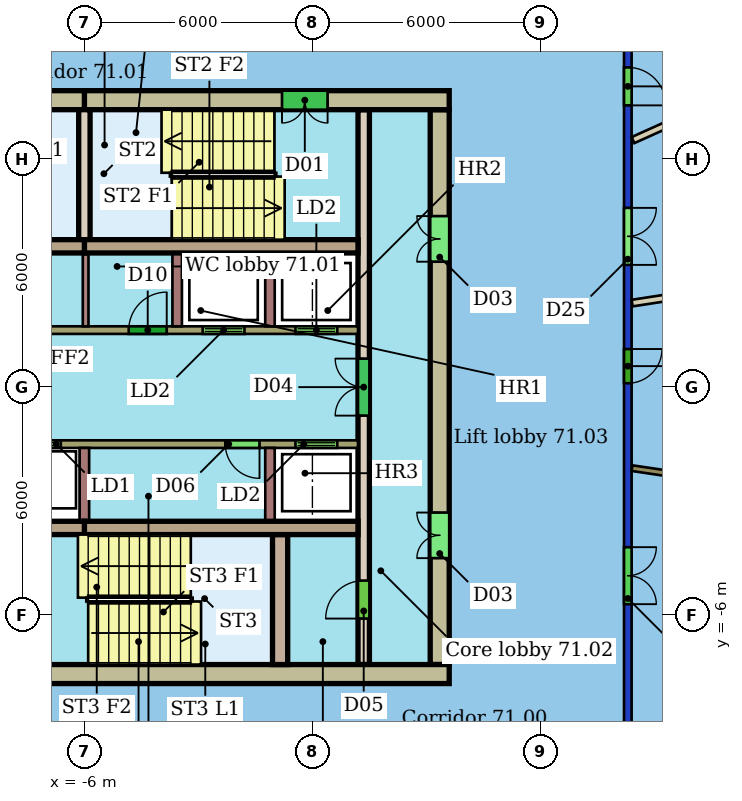
"""IFC4 building model, lengths in metres.
Left out: names, types, materials, properties, quantities, classifications, styles, units other than length and angle.
Written with IfcOpenShell. Run it as: python <this file> out.ifc"""

import sys

from ifc_helpers import new_model, si_unit, direction, frame, frame_2d, origin, place, context, subcontext, project, spatial, rectangle, extrude, element, fill, save


model = new_model("IFC4")
c1 = context("Model", 3, precision=1e-05, world=origin(), true_north=direction((0.0, 1.0)))
c2 = subcontext(c1, "Body", "Model", "MODEL_VIEW")
j1 = project(units=[si_unit("LENGTHUNIT", "METRE"), si_unit("PLANEANGLEUNIT", "RADIAN")], contexts=[c1])
p1 = place(None, origin())
s1 = spatial("IfcSite", under=j1, at=p1, CompositionType="ELEMENT")
p2 = place(p1, origin())
s2 = spatial("IfcBuilding", under=s1, at=p2, CompositionType="ELEMENT")
p3 = place(p2, frame((0.0, 0.0, 286.5)))
s3 = spatial("IfcBuildingStorey", under=s2, at=p3, CompositionType="ELEMENT", Elevation=286.5)
p4 = place(p3, frame((8.3, 9.8, 0.0), z_axis=(0.0, 0.0, 1.0), x_axis=(0.0, -1.0, 0.0)))
e1 = element("IfcWall", 1, at=p4, inside=s3, PredefinedType="PARTITIONING", context=c2, shape_type="SweptSolid", body=[
    extrude(rectangle(XDim=19.6, YDim=0.2, at=frame_2d((9.8, 0.0))), origin(), (0.0, 0.0, 1.0), 3.1),
])
p5 = place(p4, frame((14.011, 0.0, 0.0)))
e2 = element("IfcOpeningElement", 2, at=p5, cuts=e1, PredefinedType="OPENING", context=c2, shape_type="SweptSolid", body=[
    extrude(rectangle(XDim=1.5, YDim=2.1, at=frame_2d((0.75, 1.05))), frame((0.0, 0.11, 0.0), z_axis=(0.0, -1.0, 0.0), x_axis=(1.0, 0.0, 0.0)), (0.0, 0.0, 1.0), 0.22),
])
p6 = place(p4, frame((8.798, 0.0, 0.0)))
e3 = element("IfcOpeningElement", 3, at=p6, cuts=e1, PredefinedType="OPENING", context=c2, shape_type="SweptSolid", body=[
    extrude(rectangle(XDim=0.9, YDim=2.1, at=frame_2d((0.45, 1.05))), frame((0.0, 0.11, 0.0), z_axis=(0.0, -1.0, 0.0), x_axis=(1.0, 0.0, 0.0)), (0.0, 0.0, 1.0), 0.22),
])
p7 = place(p4, frame((5.084, 0.0, 0.0)))
e4 = element("IfcOpeningElement", 4, at=p7, cuts=e1, PredefinedType="OPENING", context=c2, shape_type="SweptSolid", body=[
    extrude(rectangle(XDim=1.5, YDim=2.4, at=frame_2d((0.75, 1.2))), frame((0.0, 0.11, 0.0), z_axis=(0.0, -1.0, 0.0), x_axis=(1.0, 0.0, 0.0)), (0.0, 0.0, 1.0), 0.22),
])
p8 = place(p4, frame((1.387, 0.0, 0.0)))
e5 = element("IfcOpeningElement", 5, at=p8, cuts=e1, PredefinedType="OPENING", context=c2, shape_type="SweptSolid", body=[
    extrude(rectangle(XDim=1.0, YDim=2.1, at=frame_2d((0.5, 1.05))), frame((0.0, 0.11, 0.0), z_axis=(0.0, -1.0, 0.0), x_axis=(1.0, 0.0, 0.0)), (0.0, 0.0, 1.0), 0.22),
])
p9 = place(p3, frame((14.358, -3.012, 0.0), z_axis=(0.0, 0.0, 1.0), x_axis=(-0.989233093571, 0.146348510703, 0.0)))
e6 = element("IfcWall", 6, at=p9, inside=s3, PredefinedType="PARTITIONING", context=c2, shape_type="SweptSolid", body=[
    extrude(rectangle(XDim=6.012, YDim=0.15, at=frame_2d((3.006, 0.0))), origin(), (0.0, 0.0, 1.0), 3.45),
])
p10 = place(p3, frame((15.228, 3.256, 0.0), z_axis=(0.0, 0.0, 1.0), x_axis=(-0.988435478187, -0.151642030654, 0.0)))
e7 = element("IfcWall", 7, at=p10, inside=s3, PredefinedType="PARTITIONING", context=c2, shape_type="SweptSolid", body=[
    extrude(rectangle(XDim=6.894, YDim=0.175, at=frame_2d((3.447, 0.0))), origin(), (0.0, 0.0, 1.0), 3.45),
])
p11 = place(p3, frame((14.644, 9.295, 0.0), z_axis=(0.0, 0.0, 1.0), x_axis=(-0.911835601306, -0.410555521447, 0.0)))
e8 = element("IfcWall", 8, at=p11, inside=s3, PredefinedType="PARTITIONING", context=c2, shape_type="SweptSolid", body=[
    extrude(rectangle(XDim=6.808, YDim=0.175, at=frame_2d((3.404, 0.0))), origin(), (0.0, 0.0, 1.0), 3.45),
])
p12 = place(p3, frame((3.6, 7.55, 0.0), z_axis=(0.0, 0.0, 1.0), x_axis=(-1.0, 0.0, 0.0)))
e9 = element("IfcWall", 9, at=p12, inside=s3, PredefinedType="SHEAR", context=c2, shape_type="SweptSolid", body=[
    extrude(rectangle(XDim=9.6, YDim=0.5, at=frame_2d((4.8, 0.0))), origin(), (0.0, 0.0, 1.0), 3.3),
])
p13 = place(p12, frame((3.2, 0.0, 0.0)))
e10 = element("IfcOpeningElement", 10, at=p13, cuts=e9, PredefinedType="OPENING", context=c2, shape_type="SweptSolid", body=[
    extrude(rectangle(XDim=1.2, YDim=2.1, at=frame_2d((0.6, 1.05))), frame((0.0, 0.26, 0.0), z_axis=(0.0, -1.0, 0.0), x_axis=(1.0, 0.0, 0.0)), (0.0, 0.0, 1.0), 0.52),
])
p14 = place(p3, frame((-6.0, 7.55, 0.0), z_axis=(0.0, 0.0, 1.0), x_axis=(-1.0, 0.0, 0.0)))
e11 = element("IfcWall", 11, at=p14, inside=s3, PredefinedType="SHEAR", context=c2, shape_type="SweptSolid", body=[
    extrude(rectangle(XDim=9.6, YDim=0.5, at=frame_2d((4.8, 0.0))), origin(), (0.0, 0.0, 1.0), 3.3),
])
p15 = place(p14, frame((5.2, 0.0, 0.0)))
e12 = element("IfcOpeningElement", 12, at=p15, cuts=e11, PredefinedType="OPENING", context=c2, shape_type="SweptSolid", body=[
    extrude(rectangle(XDim=1.2, YDim=2.1, at=frame_2d((0.6, 1.05))), frame((0.0, 0.26, 0.0), z_axis=(0.0, -1.0, 0.0), x_axis=(1.0, 0.0, 0.0)), (0.0, 0.0, 1.0), 0.52),
])
p16 = place(p3, frame((-15.6, -7.55, 0.0), z_axis=(0.0, 0.0, 1.0), x_axis=(1.0, 0.0, 0.0)))
e13 = element("IfcWall", 13, at=p16, inside=s3, PredefinedType="SHEAR", context=c2, shape_type="SweptSolid", body=[
    extrude(rectangle(XDim=19.2, YDim=0.5, at=frame_2d((9.6, 0.0))), origin(), (0.0, 0.0, 1.0), 3.3),
])
p17 = place(p16, frame((3.6, 0.0, 0.0)))
e14 = element("IfcOpeningElement", 14, at=p17, cuts=e13, PredefinedType="OPENING", context=c2, shape_type="SweptSolid", body=[
    extrude(rectangle(XDim=1.2, YDim=2.1, at=frame_2d((0.6, 1.05))), frame((0.0, 0.26, 0.0), z_axis=(0.0, -1.0, 0.0), x_axis=(1.0, 0.0, 0.0)), (0.0, 0.0, 1.0), 0.52),
])
p18 = place(p3, frame((3.35, -7.3, 0.0), z_axis=(0.0, 0.0, 1.0), x_axis=(0.0, 1.0, 0.0)))
e15 = element("IfcWall", 15, at=p18, inside=s3, PredefinedType="SHEAR", context=c2, shape_type="SweptSolid", body=[
    extrude(rectangle(XDim=14.6, YDim=0.5, at=frame_2d((7.3, 0.0))), origin(), (0.0, 0.0, 1.0), 3.3),
])
p19 = place(p18, frame((2.8, 0.0, 0.0)))
e16 = element("IfcOpeningElement", 16, at=p19, cuts=e15, PredefinedType="OPENING", context=c2, shape_type="SweptSolid", body=[
    extrude(rectangle(XDim=1.2, YDim=2.1, at=frame_2d((0.6, 1.05))), frame((0.0, 0.26, 0.0), z_axis=(0.0, -1.0, 0.0), x_axis=(1.0, 0.0, 0.0)), (0.0, 0.0, 1.0), 0.52),
])
p20 = place(p18, frame((10.6, 0.0, 0.0)))
e17 = element("IfcOpeningElement", 17, at=p20, cuts=e15, PredefinedType="OPENING", context=c2, shape_type="SweptSolid", body=[
    extrude(rectangle(XDim=1.2, YDim=2.1, at=frame_2d((0.6, 1.05))), frame((0.0, 0.26, 0.0), z_axis=(0.0, -1.0, 0.0), x_axis=(1.0, 0.0, 0.0)), (0.0, 0.0, 1.0), 0.52),
])
for number, where, z_axis, x_axis in (
    (18, (-13.2, 3.705, 0.0), (0.0, 0.0, 1.0), (1.0, 0.0, 0.0)),
    (19, (-6.0, 3.705, 0.0), (0.0, 0.0, 1.0), (1.0, 0.0, 0.0)),
):
    element("IfcWall", number, at=place(p3, frame(where, z_axis=z_axis, x_axis=x_axis)), inside=s3, PredefinedType="SHEAR", context=c2, shape_type="SweptSolid", body=[
        extrude(rectangle(XDim=7.2, YDim=0.35, at=frame_2d((3.6, 0.0))), origin(), (0.0, 0.0, 1.0), 3.3),
    ])
p21 = place(p3, frame((-13.2, -3.705, 0.0), z_axis=(0.0, 0.0, 1.0), x_axis=(1.0, 0.0, 0.0)))
e20 = element("IfcWall", 20, at=p21, inside=s3, PredefinedType="SHEAR", context=c2, shape_type="SweptSolid", body=[
    extrude(rectangle(XDim=7.2, YDim=0.35, at=frame_2d((3.6, 0.0))), origin(), (0.0, 0.0, 1.0), 3.3),
])
p22 = place(p21, frame((0.496, 0.0, 0.0)))
e21 = element("IfcOpeningElement", 21, at=p22, cuts=e20, PredefinedType="OPENING", context=c2, shape_type="SweptSolid", body=[
    extrude(rectangle(XDim=1.2, YDim=2.1, at=frame_2d((0.6, 1.05))), frame((0.0, 0.185, 0.0), z_axis=(0.0, -1.0, 0.0), x_axis=(1.0, 0.0, 0.0)), (0.0, 0.0, 1.0), 0.37),
])
p23 = place(p21, frame((2.938, 0.0, 0.0)))
e22 = element("IfcOpeningElement", 22, at=p23, cuts=e20, PredefinedType="OPENING", context=c2, shape_type="SweptSolid", body=[
    extrude(rectangle(XDim=1.2, YDim=2.1, at=frame_2d((0.6, 1.05))), frame((0.0, 0.185, 0.0), z_axis=(0.0, -1.0, 0.0), x_axis=(1.0, 0.0, 0.0)), (0.0, 0.0, 1.0), 0.37),
])
p24 = place(p3, frame((-6.0, -3.705, 0.0), z_axis=(0.0, 0.0, 1.0), x_axis=(1.0, 0.0, 0.0)))
e23 = element("IfcWall", 23, at=p24, inside=s3, PredefinedType="SHEAR", context=c2, shape_type="SweptSolid", body=[
    extrude(rectangle(XDim=7.2, YDim=0.35, at=frame_2d((3.6, 0.0))), origin(), (0.0, 0.0, 1.0), 3.3),
])
p25 = place(p3, frame((1.35, -7.3, 0.0), z_axis=(0.0, 0.0, 1.0), x_axis=(0.0, 1.0, 0.0)))
e24 = element("IfcWall", 24, at=p25, inside=s3, PredefinedType="SHEAR", context=c2, shape_type="SweptSolid", body=[
    extrude(rectangle(XDim=14.6, YDim=0.3, at=frame_2d((7.3, 0.0))), origin(), (0.0, 0.0, 1.0), 3.3),
])
p26 = place(p25, frame((1.21, 0.0, 0.0)))
e25 = element("IfcOpeningElement", 25, at=p26, cuts=e24, PredefinedType="OPENING", context=c2, shape_type="SweptSolid", body=[
    extrude(rectangle(XDim=1.0, YDim=2.1, at=frame_2d((0.5, 1.05))), frame((0.0, 0.16, 0.0), z_axis=(0.0, -1.0, 0.0), x_axis=(1.0, 0.0, 0.0)), (0.0, 0.0, 1.0), 0.32),
])
p27 = place(p25, frame((6.55, 0.0, 0.0)))
e26 = element("IfcOpeningElement", 26, at=p27, cuts=e24, PredefinedType="OPENING", context=c2, shape_type="SweptSolid", body=[
    extrude(rectangle(XDim=1.5, YDim=2.1, at=frame_2d((0.75, 1.05))), frame((0.0, 0.16, 0.0), z_axis=(0.0, -1.0, 0.0), x_axis=(1.0, 0.0, 0.0)), (0.0, 0.0, 1.0), 0.32),
])
p28 = place(p3, frame((-13.2, 1.5, 0.0), z_axis=(0.0, 0.0, 1.0), x_axis=(1.0, 0.0, 0.0)))
e27 = element("IfcWall", 27, at=p28, inside=s3, PredefinedType="SHEAR", context=c2, shape_type="SweptSolid", body=[
    extrude(rectangle(XDim=14.4, YDim=0.2, at=frame_2d((7.2, 0.0))), origin(), (0.0, 0.0, 1.0), 3.3),
])
p29 = place(p28, frame((10.312, 0.0, 0.0)))
e28 = element("IfcOpeningElement", 28, at=p29, cuts=e27, PredefinedType="OPENING", context=c2, shape_type="SweptSolid", body=[
    extrude(rectangle(XDim=1.1, YDim=2.1, at=frame_2d((0.55, 1.05))), frame((0.0, 0.11, 0.0), z_axis=(0.0, -1.0, 0.0), x_axis=(1.0, 0.0, 0.0)), (0.0, 0.0, 1.0), 0.22),
])
p30 = place(p28, frame((12.754, 0.0, 0.0)))
e29 = element("IfcOpeningElement", 29, at=p30, cuts=e27, PredefinedType="OPENING", context=c2, shape_type="SweptSolid", body=[
    extrude(rectangle(XDim=1.1, YDim=2.1, at=frame_2d((0.55, 1.05))), frame((0.0, 0.11, 0.0), z_axis=(0.0, -1.0, 0.0), x_axis=(1.0, 0.0, 0.0)), (0.0, 0.0, 1.0), 0.22),
])
p31 = place(p28, frame((0.15, 0.0, 0.0)))
e30 = element("IfcOpeningElement", 30, at=p31, cuts=e27, PredefinedType="OPENING", context=c2, shape_type="SweptSolid", body=[
    extrude(rectangle(XDim=0.9, YDim=2.1, at=frame_2d((0.45, 1.05))), frame((0.0, 0.11, 0.0), z_axis=(0.0, -1.0, 0.0), x_axis=(1.0, 0.0, 0.0)), (0.0, 0.0, 1.0), 0.22),
])
p32 = place(p28, frame((4.222, 0.0, 0.0)))
e31 = element("IfcOpeningElement", 31, at=p32, cuts=e27, PredefinedType="OPENING", context=c2, shape_type="SweptSolid", body=[
    extrude(rectangle(XDim=1.0, YDim=2.1, at=frame_2d((0.5, 1.05))), frame((0.0, 0.11, 0.0), z_axis=(0.0, -1.0, 0.0), x_axis=(1.0, 0.0, 0.0)), (0.0, 0.0, 1.0), 0.22),
])
p33 = place(p28, frame((8.367, 0.0, 0.0)))
e32 = element("IfcOpeningElement", 32, at=p33, cuts=e27, PredefinedType="OPENING", context=c2, shape_type="SweptSolid", body=[
    extrude(rectangle(XDim=1.0, YDim=2.1, at=frame_2d((0.5, 1.05))), frame((0.0, 0.11, 0.0), z_axis=(0.0, -1.0, 0.0), x_axis=(1.0, 0.0, 0.0)), (0.0, 0.0, 1.0), 0.22),
])
p34 = place(p3, frame((1.2, -1.5, 0.0), z_axis=(0.0, 0.0, 1.0), x_axis=(-1.0, 0.0, 0.0)))
e33 = element("IfcWall", 33, at=p34, inside=s3, PredefinedType="SHEAR", context=c2, shape_type="SweptSolid", body=[
    extrude(rectangle(XDim=14.4, YDim=0.2, at=frame_2d((7.2, 0.0))), origin(), (0.0, 0.0, 1.0), 3.3),
])
p35 = place(p34, frame((7.821, 0.0, 0.0)))
e34 = element("IfcOpeningElement", 34, at=p35, cuts=e33, PredefinedType="OPENING", context=c2, shape_type="SweptSolid", body=[
    extrude(rectangle(XDim=1.2, YDim=2.1, at=frame_2d((0.6, 1.05))), frame((0.0, 0.11, 0.0), z_axis=(0.0, -1.0, 0.0), x_axis=(1.0, 0.0, 0.0)), (0.0, 0.0, 1.0), 0.22),
])
p36 = place(p34, frame((0.546, 0.0, 0.0)))
e35 = element("IfcOpeningElement", 35, at=p36, cuts=e33, PredefinedType="OPENING", context=c2, shape_type="SweptSolid", body=[
    extrude(rectangle(XDim=1.1, YDim=2.1, at=frame_2d((0.55, 1.05))), frame((0.0, 0.11, 0.0), z_axis=(0.0, -1.0, 0.0), x_axis=(1.0, 0.0, 0.0)), (0.0, 0.0, 1.0), 0.22),
])
p37 = place(p34, frame((2.592, 0.0, 0.0)))
e36 = element("IfcOpeningElement", 36, at=p37, cuts=e33, PredefinedType="OPENING", context=c2, shape_type="SweptSolid", body=[
    extrude(rectangle(XDim=0.9, YDim=2.1, at=frame_2d((0.45, 1.05))), frame((0.0, 0.11, 0.0), z_axis=(0.0, -1.0, 0.0), x_axis=(1.0, 0.0, 0.0)), (0.0, 0.0, 1.0), 0.22),
])
p38 = place(p3, frame((-0.85, -3.88, 0.0), z_axis=(0.0, 0.0, 1.0), x_axis=(0.0, -1.0, 0.0)))
e37 = element("IfcWall", 37, at=p38, inside=s3, PredefinedType="SHEAR", context=c2, shape_type="SweptSolid", body=[
    extrude(rectangle(XDim=3.42, YDim=0.4, at=frame_2d((1.71, 0.0))), origin(), (0.0, 0.0, 1.0), 3.3),
])
p39 = place(p3, frame((-6.0, 3.88, 0.0), z_axis=(0.0, 0.0, 1.0), x_axis=(0.0, 1.0, 0.0)))
e38 = element("IfcWall", 38, at=p39, inside=s3, PredefinedType="SHEAR", context=c2, shape_type="SweptSolid", body=[
    extrude(rectangle(XDim=3.42, YDim=0.3, at=frame_2d((1.71, 0.0))), origin(), (0.0, 0.0, 1.0), 3.3),
])
for number, where, z_axis, x_axis in (
    (39, (-3.558, 1.6, 0.0), (0.0, 0.0, 1.0), (0.0, 1.0, 0.0)),
    (40, (-1.117, 1.6, 0.0), (0.0, 0.0, 1.0), (0.0, 1.0, 0.0)),
):
    element("IfcWall", number, at=place(p3, frame(where, z_axis=z_axis, x_axis=x_axis)), inside=s3, PredefinedType="SHEAR", context=c2, shape_type="SweptSolid", body=[
        extrude(rectangle(XDim=1.93, YDim=0.25, at=frame_2d((0.965, 0.0))), origin(), (0.0, 0.0, 1.0), 3.3),
    ])
p40 = place(p3, frame((-5.967, 1.6, 0.0), z_axis=(0.0, 0.0, 1.0), x_axis=(0.0, 1.0, 0.0)))
e41 = element("IfcWall", 41, at=p40, inside=s3, PredefinedType="PARTITIONING", context=c2, shape_type="SweptSolid", body=[
    extrude(rectangle(XDim=1.93, YDim=0.15, at=frame_2d((0.965, 0.0))), origin(), (0.0, 0.0, 1.0), 3.3),
])
for number, where, z_axis, x_axis in (
    (42, (-6.0, -1.6, 0.0), (0.0, 0.0, 1.0), (0.0, -1.0, 0.0)),
    (43, (-1.117, -1.6, 0.0), (0.0, 0.0, 1.0), (0.0, -1.0, 0.0)),
):
    element("IfcWall", number, at=place(p3, frame(where, z_axis=z_axis, x_axis=x_axis)), inside=s3, PredefinedType="SHEAR", context=c2, shape_type="SweptSolid", body=[
        extrude(rectangle(XDim=1.93, YDim=0.25, at=frame_2d((0.965, 0.0))), origin(), (0.0, 0.0, 1.0), 3.3),
    ])
p41 = place(p5, origin())
e44 = element("IfcDoor", 44, at=p41, inside=s3, OperationType="DOUBLE_DOOR_SINGLE_SWING", PredefinedType="DOOR", context=c2, shape_type="SweptSolid", body=[
    extrude(rectangle(XDim=1.5, YDim=2.1, at=frame_2d((0.75, 1.05))), frame((0.0, 0.025, 0.0), z_axis=(0.0, -1.0, 0.0), x_axis=(1.0, 0.0, 0.0)), (0.0, 0.0, 1.0), 0.05),
])
fill(e2, e44)
p42 = place(p6, origin())
e45 = element("IfcDoor", 45, at=p42, inside=s3, OperationType="SINGLE_SWING_LEFT", PredefinedType="DOOR", context=c2, shape_type="SweptSolid", body=[
    extrude(rectangle(XDim=0.9, YDim=2.1, at=frame_2d((0.45, 1.05))), frame((0.0, 0.025, 0.0), z_axis=(0.0, -1.0, 0.0), x_axis=(1.0, 0.0, 0.0)), (0.0, 0.0, 1.0), 0.05),
])
fill(e3, e45)
p43 = place(p7, origin())
e46 = element("IfcDoor", 46, at=p43, inside=s3, OperationType="DOUBLE_DOOR_SINGLE_SWING", PredefinedType="DOOR", context=c2, shape_type="SweptSolid", body=[
    extrude(rectangle(XDim=1.5, YDim=2.4, at=frame_2d((0.75, 1.2))), frame((0.0, 0.025, 0.0), z_axis=(0.0, -1.0, 0.0), x_axis=(1.0, 0.0, 0.0)), (0.0, 0.0, 1.0), 0.05),
])
fill(e4, e46)
p44 = place(p8, origin())
e47 = element("IfcDoor", 47, at=p44, inside=s3, OperationType="SINGLE_SWING_RIGHT", PredefinedType="DOOR", context=c2, shape_type="SweptSolid", body=[
    extrude(rectangle(XDim=1.0, YDim=2.1, at=frame_2d((0.5, 1.05))), frame((0.0, 0.025, 0.0), z_axis=(0.0, -1.0, 0.0), x_axis=(1.0, 0.0, 0.0)), (0.0, 0.0, 1.0), 0.05),
])
fill(e5, e47)
p45 = place(p13, origin())
e48 = element("IfcDoor", 48, at=p45, inside=s3, OperationType="DOUBLE_DOOR_SINGLE_SWING", PredefinedType="NOTDEFINED", context=c2, shape_type="SweptSolid", body=[
    extrude(rectangle(XDim=1.2, YDim=2.1, at=frame_2d((0.6, 1.05))), frame((0.0, 0.025, 0.0), z_axis=(0.0, -1.0, 0.0), x_axis=(1.0, 0.0, 0.0)), (0.0, 0.0, 1.0), 0.05),
])
fill(e10, e48)
p46 = place(p19, origin())
e49 = element("IfcDoor", 49, at=p46, inside=s3, OperationType="DOUBLE_DOOR_SINGLE_SWING", PredefinedType="NOTDEFINED", context=c2, shape_type="SweptSolid", body=[
    extrude(rectangle(XDim=1.2, YDim=2.1, at=frame_2d((0.6, 1.05))), frame((0.0, 0.025, 0.0), z_axis=(0.0, -1.0, 0.0), x_axis=(1.0, 0.0, 0.0)), (0.0, 0.0, 1.0), 0.05),
])
fill(e16, e49)
p47 = place(p20, origin())
e50 = element("IfcDoor", 50, at=p47, inside=s3, OperationType="DOUBLE_DOOR_SINGLE_SWING", PredefinedType="NOTDEFINED", context=c2, shape_type="SweptSolid", body=[
    extrude(rectangle(XDim=1.2, YDim=2.1, at=frame_2d((0.6, 1.05))), frame((0.0, 0.025, 0.0), z_axis=(0.0, -1.0, 0.0), x_axis=(1.0, 0.0, 0.0)), (0.0, 0.0, 1.0), 0.05),
])
fill(e17, e50)
p48 = place(p26, origin())
e51 = element("IfcDoor", 51, at=p48, inside=s3, OperationType="SINGLE_SWING_LEFT", PredefinedType="NOTDEFINED", context=c2, shape_type="SweptSolid", body=[
    extrude(rectangle(XDim=1.0, YDim=2.1, at=frame_2d((0.5, 1.05))), frame((0.0, 0.025, 0.0), z_axis=(0.0, -1.0, 0.0), x_axis=(1.0, 0.0, 0.0)), (0.0, 0.0, 1.0), 0.05),
])
fill(e25, e51)
p49 = place(p27, origin())
e52 = element("IfcDoor", 52, at=p49, inside=s3, OperationType="DOUBLE_DOOR_SINGLE_SWING", PredefinedType="NOTDEFINED", context=c2, shape_type="SweptSolid", body=[
    extrude(rectangle(XDim=1.5, YDim=2.1, at=frame_2d((0.75, 1.05))), frame((0.0, 0.025, 0.0), z_axis=(0.0, -1.0, 0.0), x_axis=(1.0, 0.0, 0.0)), (0.0, 0.0, 1.0), 0.05),
])
fill(e26, e52)
p50 = place(p29, origin())
e53 = element("IfcDoor", 53, at=p50, inside=s3, OperationType="DOUBLE_DOOR_SLIDING", PredefinedType="NOTDEFINED", context=c2, shape_type="SweptSolid", body=[
    extrude(rectangle(XDim=1.1, YDim=2.1, at=frame_2d((0.55, 1.05))), frame((0.0, 0.025, 0.0), z_axis=(0.0, -1.0, 0.0), x_axis=(1.0, 0.0, 0.0)), (0.0, 0.0, 1.0), 0.05),
])
fill(e28, e53)
p51 = place(p30, origin())
e54 = element("IfcDoor", 54, at=p51, inside=s3, OperationType="DOUBLE_DOOR_SLIDING", PredefinedType="NOTDEFINED", context=c2, shape_type="SweptSolid", body=[
    extrude(rectangle(XDim=1.1, YDim=2.1, at=frame_2d((0.55, 1.05))), frame((0.0, 0.025, 0.0), z_axis=(0.0, -1.0, 0.0), x_axis=(1.0, 0.0, 0.0)), (0.0, 0.0, 1.0), 0.05),
])
fill(e29, e54)
p52 = place(p33, origin())
e55 = element("IfcDoor", 55, at=p52, inside=s3, OperationType="SINGLE_SWING_RIGHT", PredefinedType="NOTDEFINED", context=c2, shape_type="SweptSolid", body=[
    extrude(rectangle(XDim=1.0, YDim=2.1, at=frame_2d((0.5, 1.05))), frame((0.0, 0.025, 0.0), z_axis=(0.0, -1.0, 0.0), x_axis=(1.0, 0.0, 0.0)), (0.0, 0.0, 1.0), 0.05),
])
fill(e32, e55)
p53 = place(p35, origin())
e56 = element("IfcDoor", 56, at=p53, inside=s3, OperationType="DOUBLE_DOOR_SLIDING", PredefinedType="NOTDEFINED", context=c2, shape_type="SweptSolid", body=[
    extrude(rectangle(XDim=1.2, YDim=2.1, at=frame_2d((0.6, 1.05))), frame((0.0, 0.025, 0.0), z_axis=(0.0, -1.0, 0.0), x_axis=(1.0, 0.0, 0.0)), (0.0, 0.0, 1.0), 0.05),
])
fill(e34, e56)
p54 = place(p36, origin())
e57 = element("IfcDoor", 57, at=p54, inside=s3, OperationType="DOUBLE_DOOR_SLIDING", PredefinedType="NOTDEFINED", context=c2, shape_type="SweptSolid", body=[
    extrude(rectangle(XDim=1.1, YDim=2.1, at=frame_2d((0.55, 1.05))), frame((0.0, 0.025, 0.0), z_axis=(0.0, -1.0, 0.0), x_axis=(1.0, 0.0, 0.0)), (0.0, 0.0, 1.0), 0.05),
])
fill(e35, e57)
p55 = place(p37, origin())
e58 = element("IfcDoor", 58, at=p55, inside=s3, OperationType="SINGLE_SWING_LEFT", PredefinedType="NOTDEFINED", context=c2, shape_type="SweptSolid", body=[
    extrude(rectangle(XDim=0.9, YDim=2.1, at=frame_2d((0.45, 1.05))), frame((0.0, 0.025, 0.0), z_axis=(0.0, -1.0, 0.0), x_axis=(1.0, 0.0, 0.0)), (0.0, 0.0, 1.0), 0.05),
])
fill(e36, e58)
save(model, sys.argv[1])
